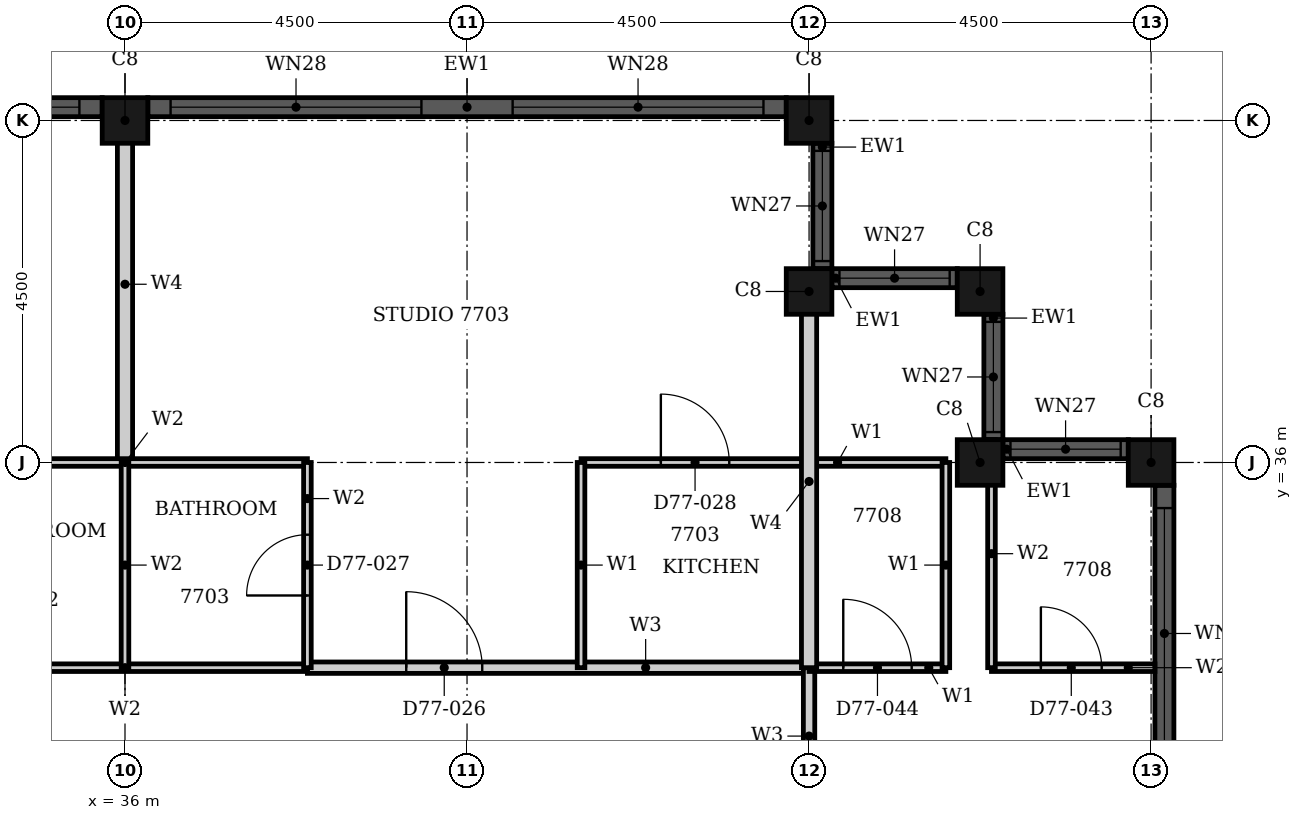
"""IFC4 building model, lengths in metres.
Left out: names, types, materials, properties, quantities, classifications, styles, units other than length and angle.
Written with IfcOpenShell. Run it as: python <this file> out.ifc"""

import sys

from ifc_helpers import new_model, si_unit, direction, frame, frame_2d, origin, origin_2d, place, context, subcontext, project, spatial, rectangle, hollow_rectangle, extrude, element, fill, save


model = new_model("IFC4")
c1 = context("Model", 3, precision=1e-05, world=origin(), true_north=direction((0.0, 1.0)))
c2 = subcontext(c1, "Body", "Model", "MODEL_VIEW")
j1 = project(units=[si_unit("LENGTHUNIT", "METRE"), si_unit("PLANEANGLEUNIT", "RADIAN")], contexts=[c1])
p1 = place(None, origin())
s1 = spatial("IfcSite", under=j1, at=p1, CompositionType="ELEMENT")
p2 = place(p1, origin())
s2 = spatial("IfcBuilding", under=s1, at=p2, CompositionType="ELEMENT")
p3 = place(p2, frame((0.0, 0.0, 301.9)))
s3 = spatial("IfcBuildingStorey", under=s2, at=p3, CompositionType="ELEMENT", Elevation=301.9)
for number, where, z_axis, x_axis in (
    (1, (49.5, 36.0, 0.0), (0.0, 0.0, 1.0), (1.0, 0.0, 0.0)),
    (2, (47.25, 36.0, 0.0), (0.0, 0.0, 1.0), (1.0, 0.0, 0.0)),
    (3, (47.25, 38.25, 0.0), (0.0, 0.0, 1.0), (1.0, 0.0, 0.0)),
    (4, (45.0, 38.25, 0.0), (0.0, 0.0, 1.0), (1.0, 0.0, 0.0)),
    (5, (45.0, 40.5, 0.0), (0.0, 0.0, 1.0), (1.0, 0.0, 0.0)),
    (6, (36.0, 40.5, 0.0), (0.0, 0.0, 1.0), (1.0, 0.0, 0.0)),
):
    element("IfcColumn", number, at=place(p3, frame(where, z_axis=z_axis, x_axis=x_axis)), inside=s3, PredefinedType="COLUMN", context=c2, shape_type="SweptSolid", body=[
        extrude(hollow_rectangle(XDim=0.6, YDim=0.6, WallThickness=0.02, at=origin_2d()), origin(), (0.0, 0.0, 1.0), 3.7),
    ])
p4 = place(p3, frame((49.675, 27.3, 0.0), z_axis=(0.0, 0.0, 1.0), x_axis=(0.0, 1.0, 0.0)))
e7 = element("IfcWall", 7, at=p4, inside=s3, PredefinedType="SOLIDWALL", context=c2, shape_type="SweptSolid", body=[
    extrude(rectangle(XDim=8.4, YDim=0.25, at=frame_2d((4.2, 0.0))), origin(), (0.0, 0.0, 1.0), 3.7),
])
p5 = place(p4, frame((0.3, 0.0, 0.45)))
e8 = element("IfcOpeningElement", 8, at=p5, cuts=e7, PredefinedType="OPENING", context=c2, shape_type="SweptSolid", body=[
    extrude(rectangle(XDim=3.3, YDim=1.8, at=frame_2d((1.65, 0.9))), frame((0.0, 0.135, 0.0), z_axis=(0.0, -1.0, 0.0), x_axis=(1.0, 0.0, 0.0)), (0.0, 0.0, 1.0), 0.27),
])
p6 = place(p4, frame((4.8, 0.0, 0.45)))
e9 = element("IfcOpeningElement", 9, at=p6, cuts=e7, PredefinedType="OPENING", context=c2, shape_type="SweptSolid", body=[
    extrude(rectangle(XDim=3.3, YDim=1.8, at=frame_2d((1.65, 0.9))), frame((0.0, 0.135, 0.0), z_axis=(0.0, -1.0, 0.0), x_axis=(1.0, 0.0, 0.0)), (0.0, 0.0, 1.0), 0.27),
])
p7 = place(p3, frame((49.2, 36.175, 0.0), z_axis=(0.0, 0.0, 1.0), x_axis=(-1.0, 0.0, 0.0)))
e10 = element("IfcWall", 10, at=p7, inside=s3, PredefinedType="SOLIDWALL", context=c2, shape_type="SweptSolid", body=[
    extrude(rectangle(XDim=1.65, YDim=0.25, at=frame_2d((0.825, 0.0))), origin(), (0.0, 0.0, 1.0), 3.7),
])
p8 = place(p7, frame((0.1, 0.0, 0.9)))
e11 = element("IfcOpeningElement", 11, at=p8, cuts=e10, PredefinedType="OPENING", context=c2, shape_type="SweptSolid", body=[
    extrude(rectangle(XDim=1.45, YDim=1.35, at=frame_2d((0.725, 0.675))), frame((0.0, 0.135, 0.0), z_axis=(0.0, -1.0, 0.0), x_axis=(1.0, 0.0, 0.0)), (0.0, 0.0, 1.0), 0.27),
])
p9 = place(p3, frame((47.425, 36.3, 0.0), z_axis=(0.0, 0.0, 1.0), x_axis=(0.0, 1.0, 0.0)))
e12 = element("IfcWall", 12, at=p9, inside=s3, PredefinedType="SOLIDWALL", context=c2, shape_type="SweptSolid", body=[
    extrude(rectangle(XDim=1.65, YDim=0.25, at=frame_2d((0.825, 0.0))), origin(), (0.0, 0.0, 1.0), 3.7),
])
p10 = place(p9, frame((0.1, 0.0, 0.9)))
e13 = element("IfcOpeningElement", 13, at=p10, cuts=e12, PredefinedType="OPENING", context=c2, shape_type="SweptSolid", body=[
    extrude(rectangle(XDim=1.45, YDim=1.35, at=frame_2d((0.725, 0.675))), frame((0.0, 0.135, 0.0), z_axis=(0.0, -1.0, 0.0), x_axis=(1.0, 0.0, 0.0)), (0.0, 0.0, 1.0), 0.27),
])
p11 = place(p3, frame((46.95, 38.425, 0.0), z_axis=(0.0, 0.0, 1.0), x_axis=(-1.0, 0.0, 0.0)))
e14 = element("IfcWall", 14, at=p11, inside=s3, PredefinedType="SOLIDWALL", context=c2, shape_type="SweptSolid", body=[
    extrude(rectangle(XDim=1.65, YDim=0.25, at=frame_2d((0.825, 0.0))), origin(), (0.0, 0.0, 1.0), 3.7),
])
p12 = place(p11, frame((0.1, 0.0, 0.9)))
e15 = element("IfcOpeningElement", 15, at=p12, cuts=e14, PredefinedType="OPENING", context=c2, shape_type="SweptSolid", body=[
    extrude(rectangle(XDim=1.45, YDim=1.35, at=frame_2d((0.725, 0.675))), frame((0.0, 0.135, 0.0), z_axis=(0.0, -1.0, 0.0), x_axis=(1.0, 0.0, 0.0)), (0.0, 0.0, 1.0), 0.27),
])
p13 = place(p3, frame((45.175, 38.55, 0.0), z_axis=(0.0, 0.0, 1.0), x_axis=(0.0, 1.0, 0.0)))
e16 = element("IfcWall", 16, at=p13, inside=s3, PredefinedType="SOLIDWALL", context=c2, shape_type="SweptSolid", body=[
    extrude(rectangle(XDim=1.65, YDim=0.25, at=frame_2d((0.825, 0.0))), origin(), (0.0, 0.0, 1.0), 3.7),
])
p14 = place(p13, frame((0.1, 0.0, 0.9)))
e17 = element("IfcOpeningElement", 17, at=p14, cuts=e16, PredefinedType="OPENING", context=c2, shape_type="SweptSolid", body=[
    extrude(rectangle(XDim=1.45, YDim=1.35, at=frame_2d((0.725, 0.675))), frame((0.0, 0.135, 0.0), z_axis=(0.0, -1.0, 0.0), x_axis=(1.0, 0.0, 0.0)), (0.0, 0.0, 1.0), 0.27),
])
p15 = place(p3, frame((44.7, 40.675, 0.0), z_axis=(0.0, 0.0, 1.0), x_axis=(-1.0, 0.0, 0.0)))
e18 = element("IfcWall", 18, at=p15, inside=s3, PredefinedType="SOLIDWALL", context=c2, shape_type="SweptSolid", body=[
    extrude(rectangle(XDim=8.4, YDim=0.25, at=frame_2d((4.2, 0.0))), origin(), (0.0, 0.0, 1.0), 3.7),
])
p16 = place(p15, frame((0.3, 0.0, 0.45)))
e19 = element("IfcOpeningElement", 19, at=p16, cuts=e18, PredefinedType="OPENING", context=c2, shape_type="SweptSolid", body=[
    extrude(rectangle(XDim=3.3, YDim=1.8, at=frame_2d((1.65, 0.9))), frame((0.0, 0.135, 0.0), z_axis=(0.0, -1.0, 0.0), x_axis=(1.0, 0.0, 0.0)), (0.0, 0.0, 1.0), 0.27),
])
p17 = place(p15, frame((4.8, 0.0, 0.45)))
e20 = element("IfcOpeningElement", 20, at=p17, cuts=e18, PredefinedType="OPENING", context=c2, shape_type="SweptSolid", body=[
    extrude(rectangle(XDim=3.3, YDim=1.8, at=frame_2d((1.65, 0.9))), frame((0.0, 0.135, 0.0), z_axis=(0.0, -1.0, 0.0), x_axis=(1.0, 0.0, 0.0)), (0.0, 0.0, 1.0), 0.27),
])
p18 = place(p3, frame((35.7, 40.675, 0.0), z_axis=(0.0, 0.0, 1.0), x_axis=(-1.0, 0.0, 0.0)))
e21 = element("IfcWall", 21, at=p18, inside=s3, PredefinedType="SOLIDWALL", context=c2, shape_type="SweptSolid", body=[
    extrude(rectangle(XDim=8.4, YDim=0.25, at=frame_2d((4.2, 0.0))), origin(), (0.0, 0.0, 1.0), 3.7),
])
p19 = place(p18, frame((0.3, 0.0, 0.45)))
e22 = element("IfcOpeningElement", 22, at=p19, cuts=e21, PredefinedType="OPENING", context=c2, shape_type="SweptSolid", body=[
    extrude(rectangle(XDim=3.3, YDim=1.8, at=frame_2d((1.65, 0.9))), frame((0.0, 0.135, 0.0), z_axis=(0.0, -1.0, 0.0), x_axis=(1.0, 0.0, 0.0)), (0.0, 0.0, 1.0), 0.27),
])
p20 = place(p18, frame((4.8, 0.0, 0.45)))
e23 = element("IfcOpeningElement", 23, at=p20, cuts=e21, PredefinedType="OPENING", context=c2, shape_type="SweptSolid", body=[
    extrude(rectangle(XDim=3.3, YDim=1.8, at=frame_2d((1.65, 0.9))), frame((0.0, 0.135, 0.0), z_axis=(0.0, -1.0, 0.0), x_axis=(1.0, 0.0, 0.0)), (0.0, 0.0, 1.0), 0.27),
])
p21 = place(p3, frame((38.4, 33.3, 0.0), z_axis=(0.0, 0.0, 1.0), x_axis=(1.0, 0.0, 0.0)))
e24 = element("IfcWall", 24, at=p21, inside=s3, PredefinedType="PARTITIONING", context=c2, shape_type="SweptSolid", body=[
    extrude(rectangle(XDim=6.6, YDim=0.15, at=frame_2d((3.3, 0.0))), origin(), (0.0, 0.0, 1.0), 3.2),
])
p22 = place(p21, frame((1.3, 0.0, 0.0)))
e25 = element("IfcOpeningElement", 25, at=p22, cuts=e24, PredefinedType="OPENING", context=c2, shape_type="SweptSolid", body=[
    extrude(rectangle(XDim=1.0, YDim=2.2, at=frame_2d((0.5, 1.1))), frame((0.0, 0.085, 0.0), z_axis=(0.0, -1.0, 0.0), x_axis=(1.0, 0.0, 0.0)), (0.0, 0.0, 1.0), 0.17),
])
p23 = place(p3, frame((45.0, 31.5, 0.0), z_axis=(0.0, 0.0, 1.0), x_axis=(0.0, 1.0, 0.0)))
e26 = element("IfcWall", 26, at=p23, inside=s3, PredefinedType="PARTITIONING", context=c2, shape_type="SweptSolid", body=[
    extrude(rectangle(XDim=1.8, YDim=0.15, at=frame_2d((0.9, 0.0))), origin(), (0.0, 0.0, 1.0), 3.2),
])
p24 = place(p3, frame((45.0, 33.3, 0.0), z_axis=(0.0, 0.0, 1.0), x_axis=(1.0, 0.0, 0.0)))
e27 = element("IfcWall", 27, at=p24, inside=s3, PredefinedType="PARTITIONING", context=c2, shape_type="SweptSolid", body=[
    extrude(rectangle(XDim=1.8, YDim=0.1, at=frame_2d((0.9, 0.0))), origin(), (0.0, 0.0, 1.0), 3.2),
])
p25 = place(p24, frame((0.45, 0.0, 0.0)))
e28 = element("IfcOpeningElement", 28, at=p25, cuts=e27, PredefinedType="OPENING", context=c2, shape_type="SweptSolid", body=[
    extrude(rectangle(XDim=0.9, YDim=2.1, at=frame_2d((0.45, 1.05))), frame((0.0, 0.06, 0.0), z_axis=(0.0, -1.0, 0.0), x_axis=(1.0, 0.0, 0.0)), (0.0, 0.0, 1.0), 0.12),
])
p26 = place(p3, frame((42.0, 36.0, 0.0), z_axis=(0.0, 0.0, 1.0), x_axis=(1.0, 0.0, 0.0)))
e29 = element("IfcWall", 29, at=p26, inside=s3, PredefinedType="PARTITIONING", context=c2, shape_type="SweptSolid", body=[
    extrude(rectangle(XDim=4.8, YDim=0.1, at=frame_2d((2.4, 0.0))), origin(), (0.0, 0.0, 1.0), 3.2),
])
p27 = place(p26, frame((1.05, 0.0, 0.0)))
e30 = element("IfcOpeningElement", 30, at=p27, cuts=e29, PredefinedType="OPENING", context=c2, shape_type="SweptSolid", body=[
    extrude(rectangle(XDim=0.9, YDim=2.1, at=frame_2d((0.45, 1.05))), frame((0.0, 0.06, 0.0), z_axis=(0.0, -1.0, 0.0), x_axis=(1.0, 0.0, 0.0)), (0.0, 0.0, 1.0), 0.12),
])
for number, where, z_axis, x_axis in (
    (31, (42.0, 33.3, 0.0), (0.0, 0.0, 1.0), (0.0, 1.0, 0.0)),
    (32, (46.8, 33.3, 0.0), (0.0, 0.0, 1.0), (0.0, 1.0, 0.0)),
):
    element("IfcWall", number, at=place(p3, frame(where, z_axis=z_axis, x_axis=x_axis)), inside=s3, PredefinedType="PARTITIONING", context=c2, shape_type="SweptSolid", body=[
        extrude(rectangle(XDim=2.7, YDim=0.1, at=frame_2d((1.35, 0.0))), origin(), (0.0, 0.0, 1.0), 3.2),
    ])
p28 = place(p3, frame((36.0, 36.0, 0.0), z_axis=(0.0, 0.0, 1.0), x_axis=(0.0, 1.0, 0.0)))
e33 = element("IfcWall", 33, at=p28, inside=s3, PredefinedType="PARTITIONING", context=c2, shape_type="SweptSolid", body=[
    extrude(rectangle(XDim=4.69, YDim=0.2, at=frame_2d((2.345, 0.0))), origin(), (0.0, 0.0, 1.0), 3.2),
])
p29 = place(p3, frame((45.0, 33.3, 0.0), z_axis=(0.0, 0.0, 1.0), x_axis=(0.0, 1.0, 0.0)))
e34 = element("IfcWall", 34, at=p29, inside=s3, PredefinedType="PARTITIONING", context=c2, shape_type="SweptSolid", body=[
    extrude(rectangle(XDim=4.9, YDim=0.2, at=frame_2d((2.45, 0.0))), origin(), (0.0, 0.0, 1.0), 3.2),
])
p30 = place(p3, frame((33.6, 33.3, 0.0), z_axis=(0.0, 0.0, 1.0), x_axis=(1.0, 0.0, 0.0)))
e35 = element("IfcWall", 35, at=p30, inside=s3, PredefinedType="PARTITIONING", context=c2, shape_type="SweptSolid", body=[
    extrude(rectangle(XDim=4.8, YDim=0.1, at=frame_2d((2.4, 0.0))), origin(), (0.0, 0.0, 1.0), 3.2),
])
p31 = place(p3, frame((47.4, 33.3, 0.0), z_axis=(0.0, 0.0, 1.0), x_axis=(1.0, 0.0, 0.0)))
e36 = element("IfcWall", 36, at=p31, inside=s3, PredefinedType="PARTITIONING", context=c2, shape_type="SweptSolid", body=[
    extrude(rectangle(XDim=2.15, YDim=0.1, at=frame_2d((1.075, 0.0))), origin(), (0.0, 0.0, 1.0), 3.2),
])
p32 = place(p31, frame((0.65, 0.0, 0.0)))
e37 = element("IfcOpeningElement", 37, at=p32, cuts=e36, PredefinedType="OPENING", context=c2, shape_type="SweptSolid", body=[
    extrude(rectangle(XDim=0.8, YDim=2.1, at=frame_2d((0.4, 1.05))), frame((0.0, 0.06, 0.0), z_axis=(0.0, -1.0, 0.0), x_axis=(1.0, 0.0, 0.0)), (0.0, 0.0, 1.0), 0.12),
])
p33 = place(p3, frame((33.6, 36.0, 0.0), z_axis=(0.0, 0.0, 1.0), x_axis=(1.0, 0.0, 0.0)))
e38 = element("IfcWall", 38, at=p33, inside=s3, PredefinedType="PARTITIONING", context=c2, shape_type="SweptSolid", body=[
    extrude(rectangle(XDim=4.8, YDim=0.1, at=frame_2d((2.4, 0.0))), origin(), (0.0, 0.0, 1.0), 3.2),
])
p34 = place(p3, frame((36.0, 33.3, 0.0), z_axis=(0.0, 0.0, 1.0), x_axis=(0.0, 1.0, 0.0)))
e39 = element("IfcWall", 39, at=p34, inside=s3, PredefinedType="PARTITIONING", context=c2, shape_type="SweptSolid", body=[
    extrude(rectangle(XDim=2.7, YDim=0.1, at=frame_2d((1.35, 0.0))), origin(), (0.0, 0.0, 1.0), 3.2),
])
p35 = place(p3, frame((38.4, 33.3, 0.0), z_axis=(0.0, 0.0, 1.0), x_axis=(0.0, 1.0, 0.0)))
e40 = element("IfcWall", 40, at=p35, inside=s3, PredefinedType="PARTITIONING", context=c2, shape_type="SweptSolid", body=[
    extrude(rectangle(XDim=2.7, YDim=0.1, at=frame_2d((1.35, 0.0))), origin(), (0.0, 0.0, 1.0), 3.2),
])
p36 = place(p35, frame((0.95, 0.0, 0.0)))
e41 = element("IfcOpeningElement", 41, at=p36, cuts=e40, PredefinedType="OPENING", context=c2, shape_type="SweptSolid", body=[
    extrude(rectangle(XDim=0.8, YDim=2.1, at=frame_2d((0.4, 1.05))), frame((0.0, 0.06, 0.0), z_axis=(0.0, -1.0, 0.0), x_axis=(1.0, 0.0, 0.0)), (0.0, 0.0, 1.0), 0.12),
])
p37 = place(p3, frame((47.4, 33.3, 0.0), z_axis=(0.0, 0.0, 1.0), x_axis=(0.0, 1.0, 0.0)))
e42 = element("IfcWall", 42, at=p37, inside=s3, PredefinedType="PARTITIONING", context=c2, shape_type="SweptSolid", body=[
    extrude(rectangle(XDim=3.0, YDim=0.1, at=frame_2d((1.5, 0.0))), origin(), (0.0, 0.0, 1.0), 3.2),
])
p38 = place(p6, origin())
e43 = element("IfcWindow", 43, at=p38, inside=s3, PartitioningType="SINGLE_PANEL", PredefinedType="WINDOW", context=c2, shape_type="SweptSolid", body=[
    extrude(rectangle(XDim=3.3, YDim=1.8, at=frame_2d((1.65, 0.9))), frame((0.0, 0.03, 0.0), z_axis=(0.0, -1.0, 0.0), x_axis=(1.0, 0.0, 0.0)), (0.0, 0.0, 1.0), 0.06),
])
fill(e9, e43)
p39 = place(p8, origin())
e44 = element("IfcWindow", 44, at=p39, inside=s3, PartitioningType="SINGLE_PANEL", PredefinedType="WINDOW", context=c2, shape_type="SweptSolid", body=[
    extrude(rectangle(XDim=1.45, YDim=1.35, at=frame_2d((0.725, 0.675))), frame((0.0, 0.03, 0.0), z_axis=(0.0, -1.0, 0.0), x_axis=(1.0, 0.0, 0.0)), (0.0, 0.0, 1.0), 0.06),
])
fill(e11, e44)
p40 = place(p10, origin())
e45 = element("IfcWindow", 45, at=p40, inside=s3, PartitioningType="SINGLE_PANEL", PredefinedType="WINDOW", context=c2, shape_type="SweptSolid", body=[
    extrude(rectangle(XDim=1.45, YDim=1.35, at=frame_2d((0.725, 0.675))), frame((0.0, 0.03, 0.0), z_axis=(0.0, -1.0, 0.0), x_axis=(1.0, 0.0, 0.0)), (0.0, 0.0, 1.0), 0.06),
])
fill(e13, e45)
p41 = place(p12, origin())
e46 = element("IfcWindow", 46, at=p41, inside=s3, PartitioningType="SINGLE_PANEL", PredefinedType="WINDOW", context=c2, shape_type="SweptSolid", body=[
    extrude(rectangle(XDim=1.45, YDim=1.35, at=frame_2d((0.725, 0.675))), frame((0.0, 0.03, 0.0), z_axis=(0.0, -1.0, 0.0), x_axis=(1.0, 0.0, 0.0)), (0.0, 0.0, 1.0), 0.06),
])
fill(e15, e46)
p42 = place(p14, origin())
e47 = element("IfcWindow", 47, at=p42, inside=s3, PartitioningType="SINGLE_PANEL", PredefinedType="WINDOW", context=c2, shape_type="SweptSolid", body=[
    extrude(rectangle(XDim=1.45, YDim=1.35, at=frame_2d((0.725, 0.675))), frame((0.0, 0.03, 0.0), z_axis=(0.0, -1.0, 0.0), x_axis=(1.0, 0.0, 0.0)), (0.0, 0.0, 1.0), 0.06),
])
fill(e17, e47)
p43 = place(p16, origin())
e48 = element("IfcWindow", 48, at=p43, inside=s3, PartitioningType="SINGLE_PANEL", PredefinedType="WINDOW", context=c2, shape_type="SweptSolid", body=[
    extrude(rectangle(XDim=3.3, YDim=1.8, at=frame_2d((1.65, 0.9))), frame((0.0, 0.03, 0.0), z_axis=(0.0, -1.0, 0.0), x_axis=(1.0, 0.0, 0.0)), (0.0, 0.0, 1.0), 0.06),
])
fill(e19, e48)
p44 = place(p17, origin())
e49 = element("IfcWindow", 49, at=p44, inside=s3, PartitioningType="SINGLE_PANEL", PredefinedType="WINDOW", context=c2, shape_type="SweptSolid", body=[
    extrude(rectangle(XDim=3.3, YDim=1.8, at=frame_2d((1.65, 0.9))), frame((0.0, 0.03, 0.0), z_axis=(0.0, -1.0, 0.0), x_axis=(1.0, 0.0, 0.0)), (0.0, 0.0, 1.0), 0.06),
])
fill(e20, e49)
p45 = place(p19, origin())
e50 = element("IfcWindow", 50, at=p45, inside=s3, PartitioningType="SINGLE_PANEL", PredefinedType="WINDOW", context=c2, shape_type="SweptSolid", body=[
    extrude(rectangle(XDim=3.3, YDim=1.8, at=frame_2d((1.65, 0.9))), frame((0.0, 0.03, 0.0), z_axis=(0.0, -1.0, 0.0), x_axis=(1.0, 0.0, 0.0)), (0.0, 0.0, 1.0), 0.06),
])
fill(e22, e50)
p46 = place(p22, origin())
e51 = element("IfcDoor", 51, at=p46, inside=s3, OperationType="SINGLE_SWING_RIGHT", PredefinedType="DOOR", context=c2, shape_type="SweptSolid", body=[
    extrude(rectangle(XDim=1.0, YDim=2.2, at=frame_2d((0.5, 1.1))), frame((0.0, 0.025, 0.0), z_axis=(0.0, -1.0, 0.0), x_axis=(1.0, 0.0, 0.0)), (0.0, 0.0, 1.0), 0.05),
])
fill(e25, e51)
p47 = place(p36, origin())
e52 = element("IfcDoor", 52, at=p47, inside=s3, OperationType="SINGLE_SWING_LEFT", PredefinedType="DOOR", context=c2, shape_type="SweptSolid", body=[
    extrude(rectangle(XDim=0.8, YDim=2.1, at=frame_2d((0.4, 1.05))), frame((0.0, 0.025, 0.0), z_axis=(0.0, -1.0, 0.0), x_axis=(1.0, 0.0, 0.0)), (0.0, 0.0, 1.0), 0.05),
])
fill(e41, e52)
p48 = place(p27, origin())
e53 = element("IfcDoor", 53, at=p48, inside=s3, OperationType="SINGLE_SWING_LEFT", PredefinedType="DOOR", context=c2, shape_type="SweptSolid", body=[
    extrude(rectangle(XDim=0.9, YDim=2.1, at=frame_2d((0.45, 1.05))), frame((0.0, 0.025, 0.0), z_axis=(0.0, -1.0, 0.0), x_axis=(1.0, 0.0, 0.0)), (0.0, 0.0, 1.0), 0.05),
])
fill(e30, e53)
p49 = place(p32, origin())
e54 = element("IfcDoor", 54, at=p49, inside=s3, OperationType="SINGLE_SWING_RIGHT", PredefinedType="DOOR", context=c2, shape_type="SweptSolid", body=[
    extrude(rectangle(XDim=0.8, YDim=2.1, at=frame_2d((0.4, 1.05))), frame((0.0, 0.025, 0.0), z_axis=(0.0, -1.0, 0.0), x_axis=(1.0, 0.0, 0.0)), (0.0, 0.0, 1.0), 0.05),
])
fill(e37, e54)
p50 = place(p25, origin())
e55 = element("IfcDoor", 55, at=p50, inside=s3, OperationType="SINGLE_SWING_LEFT", PredefinedType="DOOR", context=c2, shape_type="SweptSolid", body=[
    extrude(rectangle(XDim=0.9, YDim=2.1, at=frame_2d((0.45, 1.05))), frame((0.0, 0.025, 0.0), z_axis=(0.0, -1.0, 0.0), x_axis=(1.0, 0.0, 0.0)), (0.0, 0.0, 1.0), 0.05),
])
fill(e28, e55)
save(model, sys.argv[1])
